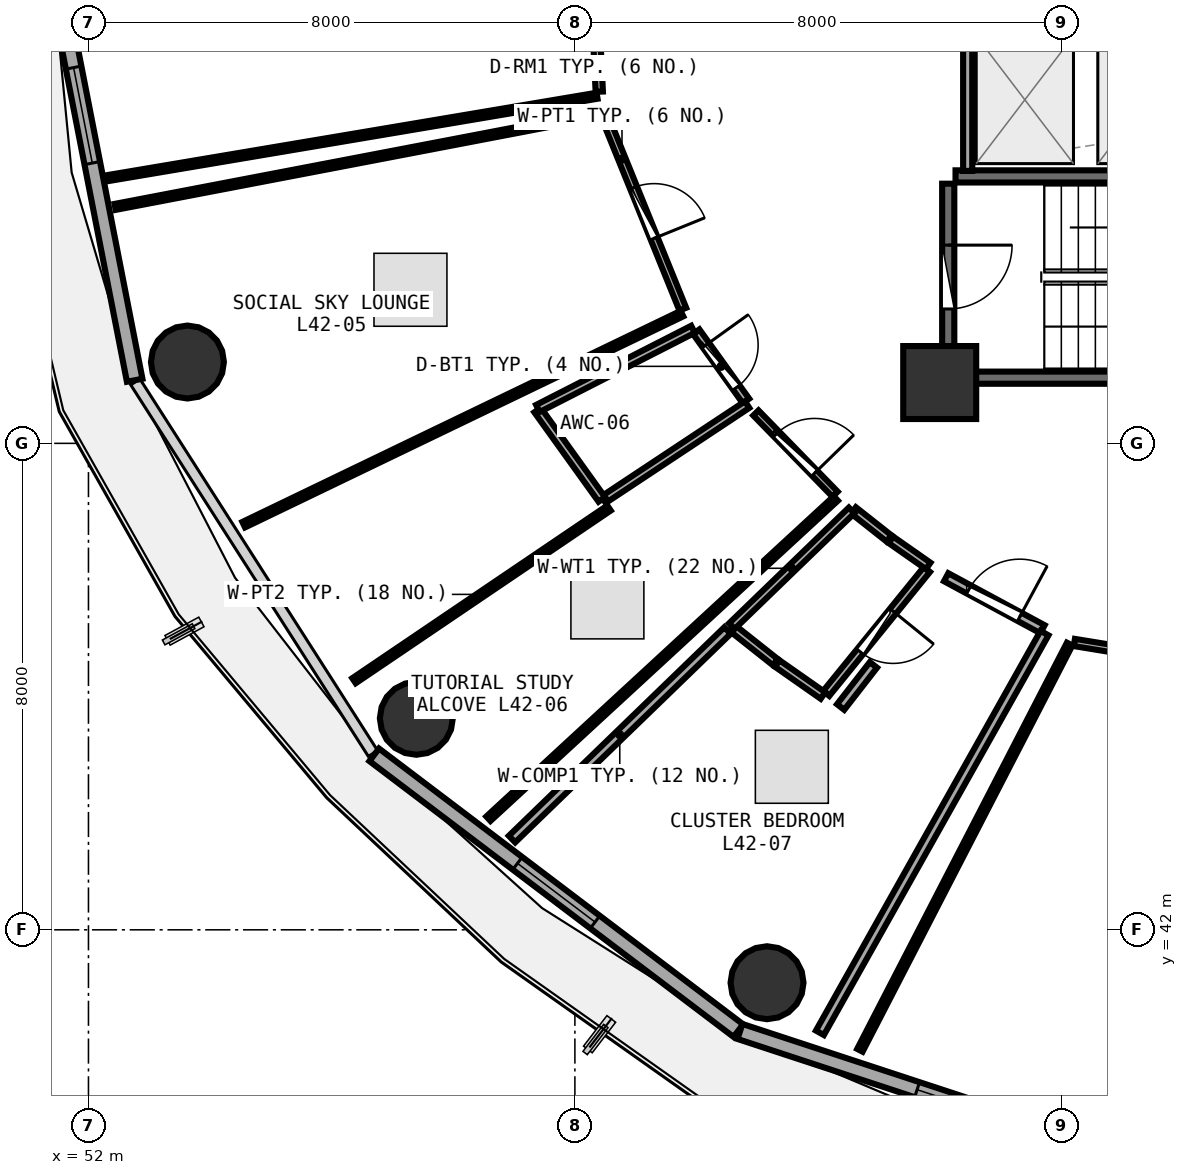
"""IFC4 building model, lengths in metres.
Left out: names, types, materials, properties, quantities, classifications, styles, units other than length and angle.
Written with IfcOpenShell. Run it as: python <this file> out.ifc"""

import sys

from ifc_helpers import new_model, si_unit, direction, frame, frame_2d, origin, origin_2d, place, context, subcontext, project, spatial, rectangle, circle, extrude, element, fill, save


model = new_model("IFC4")
c1 = context("Model", 3, precision=1e-05, world=origin(), true_north=direction((0.0, 1.0)))
c2 = subcontext(c1, "Body", "Model", "MODEL_VIEW")
j1 = project(units=[si_unit("LENGTHUNIT", "METRE"), si_unit("PLANEANGLEUNIT", "RADIAN")], contexts=[c1])
p1 = place(None, origin())
s1 = spatial("IfcSite", under=j1, at=p1, CompositionType="ELEMENT")
p2 = place(p1, origin())
s2 = spatial("IfcBuilding", under=s1, at=p2, CompositionType="ELEMENT")
p3 = place(p2, frame((0.0, 0.0, 165.6)))
s3 = spatial("IfcBuildingStorey", under=s2, at=p3, CompositionType="ELEMENT", Elevation=165.6)
p4 = place(p3, frame((66.0, 51.0, 0.0), z_axis=(0.0, 0.0, 1.0), x_axis=(1.0, 0.0, 0.0)))
e1 = element("IfcColumn", 1, at=p4, inside=s3, PredefinedType="PILASTER", context=c2, shape_type="SweptSolid", body=[
    extrude(rectangle(XDim=1.2, YDim=1.2, at=origin_2d()), origin(), (0.0, 0.0, 1.0), 3.75),
])
for number, where, z_axis, x_axis in (
    (2, (53.627, 51.337, 0.0), (0.0, 0.0, 1.0), (1.0, 0.0, 0.0)),
    (3, (57.392, 45.479, 0.0), (0.0, 0.0, 1.0), (1.0, 0.0, 0.0)),
    (4, (63.16, 41.13, 0.0), (0.0, 0.0, 1.0), (1.0, 0.0, 0.0)),
):
    element("IfcColumn", number, at=place(p3, frame(where, z_axis=z_axis, x_axis=x_axis)), inside=s3, PredefinedType="COLUMN", context=c2, shape_type="SweptSolid", body=[
        extrude(circle(Radius=0.6, at=origin_2d()), origin(), (0.0, 0.0, 1.0), 3.75),
    ])
p5 = place(p3, frame((51.403, 57.985, 0.0), z_axis=(0.0, 0.0, 1.0), x_axis=(0.191716984769, -0.981450252306, 0.0)))
e5 = element("IfcWall", 5, at=p5, inside=s3, PredefinedType="SOLIDWALL", context=c2, shape_type="SweptSolid", body=[
    extrude(rectangle(XDim=7.079, YDim=0.26, at=frame_2d((3.54, 0.0))), origin(), (0.0, 0.0, 1.0), 3.475),
])
p6 = place(p5, frame((1.84, 0.0, 0.85)))
e6 = element("IfcOpeningElement", 6, at=p6, cuts=e5, PredefinedType="OPENING", context=c2, shape_type="SweptSolid", body=[
    extrude(rectangle(XDim=1.6, YDim=1.45, at=frame_2d((0.8, 0.725))), frame((0.0, 0.14, 0.0), z_axis=(0.0, -1.0, 0.0), x_axis=(1.0, 0.0, 0.0)), (0.0, 0.0, 1.0), 0.28),
])
p7 = place(p3, frame((56.699, 44.878, 0.0), z_axis=(0.0, 0.0, 1.0), x_axis=(0.797163719609, -0.603763202042, 0.0)))
e7 = element("IfcWall", 7, at=p7, inside=s3, PredefinedType="SOLIDWALL", context=c2, shape_type="SweptSolid", body=[
    extrude(rectangle(XDim=7.512, YDim=0.26, at=frame_2d((3.756, 0.0))), origin(), (0.0, 0.0, 1.0), 3.475),
])
p8 = place(p7, frame((2.956, 0.0, 0.85)))
e8 = element("IfcOpeningElement", 8, at=p8, cuts=e7, PredefinedType="OPENING", context=c2, shape_type="SweptSolid", body=[
    extrude(rectangle(XDim=1.6, YDim=1.45, at=frame_2d((0.8, 0.725))), frame((0.0, 0.14, 0.0), z_axis=(0.0, -1.0, 0.0), x_axis=(1.0, 0.0, 0.0)), (0.0, 0.0, 1.0), 0.28),
])
p9 = place(p3, frame((62.714, 40.328, 0.0), z_axis=(0.0, 0.0, 1.0), x_axis=(0.950038302428, -0.312133343173, 0.0)))
e9 = element("IfcWall", 9, at=p9, inside=s3, PredefinedType="SOLIDWALL", context=c2, shape_type="SweptSolid", body=[
    extrude(rectangle(XDim=7.733, YDim=0.26, at=frame_2d((3.867, 0.0))), origin(), (0.0, 0.0, 1.0), 3.475),
])
p10 = place(p9, frame((3.067, 0.0, 0.85)))
e10 = element("IfcOpeningElement", 10, at=p10, cuts=e9, PredefinedType="OPENING", context=c2, shape_type="SweptSolid", body=[
    extrude(rectangle(XDim=1.6, YDim=1.45, at=frame_2d((0.8, 0.725))), frame((0.0, 0.14, 0.0), z_axis=(0.0, -1.0, 0.0), x_axis=(1.0, 0.0, 0.0)), (0.0, 0.0, 1.0), 0.28),
])
for number, where, z_axis, x_axis in (
    (11, (66.26, 51.08, 0.0), (0.0, 0.0, 1.0), (1.0, 0.0, 0.0)),
    (12, (73.42, 54.39, 0.0), (0.0, 0.0, 1.0), (-1.0, 0.0, 0.0)),
):
    element("IfcWall", number, at=place(p3, frame(where, z_axis=z_axis, x_axis=x_axis)), inside=s3, PredefinedType="SHEAR", context=c2, shape_type="SweptSolid", body=[
        extrude(rectangle(XDim=7.16, YDim=0.2, at=frame_2d((3.58, 0.0))), origin(), (0.0, 0.0, 1.0), 3.49),
    ])
p11 = place(p3, frame((66.14, 54.27, 0.0), z_axis=(0.0, 0.0, 1.0), x_axis=(0.0, -1.0, 0.0)))
e13 = element("IfcWall", 13, at=p11, inside=s3, PredefinedType="SHEAR", context=c2, shape_type="SweptSolid", body=[
    extrude(rectangle(XDim=3.07, YDim=0.2, at=frame_2d((1.535, 0.0))), origin(), (0.0, 0.0, 1.0), 3.49),
])
p12 = place(p11, frame((1.01, 0.0, 0.0)))
e14 = element("IfcOpeningElement", 14, at=p12, cuts=e13, PredefinedType="OPENING", context=c2, shape_type="SweptSolid", body=[
    extrude(rectangle(XDim=1.05, YDim=2.1, at=frame_2d((0.525, 1.05))), frame((0.0, 0.11, 0.0), z_axis=(0.0, -1.0, 0.0), x_axis=(1.0, 0.0, 0.0)), (0.0, 0.0, 1.0), 0.22),
])
p13 = place(p3, frame((66.46, 54.48, 0.0), z_axis=(0.0, 0.0, 1.0), x_axis=(0.0, 1.0, 0.0)))
e15 = element("IfcWall", 15, at=p13, inside=s3, PredefinedType="PARTITIONING", context=c2, shape_type="SweptSolid", body=[
    extrude(rectangle(XDim=2.29, YDim=0.15, at=frame_2d((1.145, 0.0))), origin(), (0.0, 0.0, 1.0), 3.48),
])
p14 = place(p3, frame((68.214, 46.725, 0.0), z_axis=(0.0, 0.0, 1.0), x_axis=(0.986922164317, -0.161197523493, 0.0)))
e16 = element("IfcWall", 16, at=p14, inside=s3, PredefinedType="PARTITIONING", context=c2, shape_type="SweptSolid", body=[
    extrude(rectangle(XDim=6.877, YDim=0.12, at=frame_2d((3.439, 0.0))), origin(), (0.0, 0.0, 1.0), 2.975),
])
p15 = place(p14, frame((2.989, 0.0, 0.0)))
e17 = element("IfcOpeningElement", 17, at=p15, cuts=e16, PredefinedType="OPENING", context=c2, shape_type="SweptSolid", body=[
    extrude(rectangle(XDim=0.9, YDim=2.08, at=frame_2d((0.45, 1.04))), frame((0.0, 0.07, 0.0), z_axis=(0.0, -1.0, 0.0), x_axis=(1.0, 0.0, 0.0)), (0.0, 0.0, 1.0), 0.14),
])
p16 = place(p3, frame((60.238, 59.144, 0.0), z_axis=(0.0, 0.0, 1.0), x_axis=(0.048537190422, -0.998821375996, 0.0)))
e18 = element("IfcWall", 18, at=p16, inside=s3, PredefinedType="PARTITIONING", context=c2, shape_type="SweptSolid", body=[
    extrude(rectangle(XDim=3.365, YDim=0.12, at=frame_2d((1.683, 0.0))), origin(), (0.0, 0.0, 1.0), 2.975),
])
p17 = place(p16, frame((1.233, 0.0, 0.0)))
e19 = element("IfcOpeningElement", 19, at=p17, cuts=e18, PredefinedType="OPENING", context=c2, shape_type="SweptSolid", body=[
    extrude(rectangle(XDim=0.9, YDim=2.08, at=frame_2d((0.45, 1.04))), frame((0.0, 0.07, 0.0), z_axis=(0.0, -1.0, 0.0), x_axis=(1.0, 0.0, 0.0)), (0.0, 0.0, 1.0), 0.14),
])
p18 = place(p3, frame((60.492, 55.369, 0.0), z_axis=(0.0, 0.0, 1.0), x_axis=(0.3756420079, -0.926764847143, 0.0)))
e20 = element("IfcWall", 20, at=p18, inside=s3, PredefinedType="PARTITIONING", context=c2, shape_type="SweptSolid", body=[
    extrude(rectangle(XDim=3.413, YDim=0.12, at=frame_2d((1.707, 0.0))), origin(), (0.0, 0.0, 1.0), 3.235),
])
p19 = place(p18, frame((1.256, 0.0, 0.0)))
e21 = element("IfcOpeningElement", 21, at=p19, cuts=e20, PredefinedType="OPENING", context=c2, shape_type="SweptSolid", body=[
    extrude(rectangle(XDim=0.9, YDim=2.08, at=frame_2d((0.45, 1.04))), frame((0.0, 0.07, 0.0), z_axis=(0.0, -1.0, 0.0), x_axis=(1.0, 0.0, 0.0)), (0.0, 0.0, 1.0), 0.14),
])
p20 = place(p3, frame((61.995, 51.836, 0.0), z_axis=(0.0, 0.0, 1.0), x_axis=(0.583589438572, -0.81204886995, 0.0)))
e22 = element("IfcWall", 22, at=p20, inside=s3, PredefinedType="PLUMBINGWALL", context=c2, shape_type="SweptSolid", body=[
    extrude(rectangle(XDim=1.403, YDim=0.13, at=frame_2d((0.702, 0.0))), origin(), (0.0, 0.0, 1.0), 2.975),
])
p21 = place(p20, frame((0.272, 0.0, 0.0)))
e23 = element("IfcOpeningElement", 23, at=p21, cuts=e22, PredefinedType="OPENING", context=c2, shape_type="SweptSolid", body=[
    extrude(rectangle(XDim=0.86, YDim=2.05, at=frame_2d((0.43, 1.025))), frame((0.0, 0.075, 0.0), z_axis=(0.0, -1.0, 0.0), x_axis=(1.0, 0.0, 0.0)), (0.0, 0.0, 1.0), 0.15),
])
p22 = place(p3, frame((62.977, 50.5, 0.0), z_axis=(0.0, 0.0, 1.0), x_axis=(0.69801962686, -0.71607862733, 0.0)))
e24 = element("IfcWall", 24, at=p22, inside=s3, PredefinedType="PARTITIONING", context=c2, shape_type="SweptSolid", body=[
    extrude(rectangle(XDim=1.866, YDim=0.12, at=frame_2d((0.933, 0.0))), origin(), (0.0, 0.0, 1.0), 2.975),
])
p23 = place(p22, frame((0.483, 0.0, 0.0)))
e25 = element("IfcOpeningElement", 25, at=p23, cuts=e24, PredefinedType="OPENING", context=c2, shape_type="SweptSolid", body=[
    extrude(rectangle(XDim=0.9, YDim=2.08, at=frame_2d((0.45, 1.04))), frame((0.0, 0.07, 0.0), z_axis=(0.0, -1.0, 0.0), x_axis=(1.0, 0.0, 0.0)), (0.0, 0.0, 1.0), 0.14),
])
p24 = place(p3, frame((65.789, 47.927, 0.0), z_axis=(0.0, 0.0, 1.0), x_axis=(-0.630358119741, -0.776304476914, 0.0)))
e26 = element("IfcWall", 26, at=p24, inside=s3, PredefinedType="PLUMBINGWALL", context=c2, shape_type="SweptSolid", body=[
    extrude(rectangle(XDim=2.626, YDim=0.13, at=frame_2d((1.313, 0.0))), origin(), (0.0, 0.0, 1.0), 2.975),
])
p25 = place(p24, frame((0.883, 0.0, 0.0)))
e27 = element("IfcOpeningElement", 27, at=p25, cuts=e26, PredefinedType="OPENING", context=c2, shape_type="SweptSolid", body=[
    extrude(rectangle(XDim=0.86, YDim=2.05, at=frame_2d((0.43, 1.025))), frame((0.0, 0.075, 0.0), z_axis=(0.0, -1.0, 0.0), x_axis=(1.0, 0.0, 0.0)), (0.0, 0.0, 1.0), 0.15),
])
p26 = place(p3, frame((66.106, 47.799, 0.0), z_axis=(0.0, 0.0, 1.0), x_axis=(0.880052757217, -0.474875925389, 0.0)))
e28 = element("IfcWall", 28, at=p26, inside=s3, PredefinedType="PARTITIONING", context=c2, shape_type="SweptSolid", body=[
    extrude(rectangle(XDim=1.801, YDim=0.15, at=frame_2d((0.9, 0.0))), origin(), (0.0, 0.0, 1.0), 3.235),
])
p27 = place(p26, frame((0.425, 0.0, 0.0)))
e29 = element("IfcOpeningElement", 29, at=p27, cuts=e28, PredefinedType="OPENING", context=c2, shape_type="SweptSolid", body=[
    extrude(rectangle(XDim=0.95, YDim=2.08, at=frame_2d((0.475, 1.04))), frame((0.0, 0.085, 0.0), z_axis=(0.0, -1.0, 0.0), x_axis=(1.0, 0.0, 0.0)), (0.0, 0.0, 1.0), 0.17),
])
p28 = place(p3, frame((64.688, 40.019, 0.0), z_axis=(0.0, 0.0, 1.0), x_axis=(0.458748787104, 0.888566007864, 0.0)))
e30 = element("IfcWall", 30, at=p28, inside=s3, PredefinedType="PARTITIONING", context=c2, shape_type="SweptSolid", body=[
    extrude(rectangle(XDim=7.519, YDim=0.1, at=frame_2d((3.759, 0.0))), origin(), (0.0, 0.0, 1.0), 3.025),
])
p29 = place(p3, frame((60.365, 55.716, 0.0), z_axis=(0.0, 0.0, 1.0), x_axis=(-0.986127701838, -0.165988420279, 0.0)))
e31 = element("IfcWall", 31, at=p29, inside=s3, PredefinedType="PARTITIONING", context=c2, shape_type="SweptSolid", body=[
    extrude(rectangle(XDim=8.144, YDim=0.1, at=frame_2d((4.072, 0.0))), origin(), (0.0, 0.0, 1.0), 3.025),
])
p30 = place(p3, frame((61.761, 52.134, 0.0), z_axis=(0.0, 0.0, 1.0), x_axis=(-0.900968975812, -0.433883515042, 0.0)))
e32 = element("IfcWall", 32, at=p30, inside=s3, PredefinedType="PARTITIONING", context=c2, shape_type="SweptSolid", body=[
    extrude(rectangle(XDim=8.0, YDim=0.1, at=frame_2d((4.0, 0.0))), origin(), (0.0, 0.0, 1.0), 2.975),
])
p31 = place(p3, frame((52.438, 53.888, 0.0), z_axis=(0.0, 0.0, 1.0), x_axis=(0.982187250003, 0.187904778897, 0.0)))
e33 = element("IfcWall", 33, at=p31, inside=s3, PredefinedType="PARTITIONING", context=c2, shape_type="SweptSolid", body=[
    extrude(rectangle(XDim=8.137, YDim=0.1, at=frame_2d((4.069, 0.0))), origin(), (0.0, 0.0, 1.0), 3.025),
])
p32 = place(p3, frame((62.832, 50.637, 0.0), z_axis=(0.0, 0.0, 1.0), x_axis=(-0.833743735775, -0.55215159427, 0.0)))
e34 = element("IfcWall", 34, at=p32, inside=s3, PredefinedType="PLUMBINGWALL", context=c2, shape_type="SweptSolid", body=[
    extrude(rectangle(XDim=2.833, YDim=0.13, at=frame_2d((1.416, 0.0))), origin(), (0.0, 0.0, 1.0), 3.235),
])
p33 = place(p3, frame((60.442, 49.078, 0.0), z_axis=(0.0, 0.0, 1.0), x_axis=(-0.583480474688, 0.812127167172, 0.0)))
e35 = element("IfcWall", 35, at=p33, inside=s3, PredefinedType="PLUMBINGWALL", context=c2, shape_type="SweptSolid", body=[
    extrude(rectangle(XDim=1.811, YDim=0.13, at=frame_2d((0.906, 0.0))), origin(), (0.0, 0.0, 1.0), 3.48),
])
p34 = place(p3, frame((59.392, 50.574, 0.0), z_axis=(0.0, 0.0, 1.0), x_axis=(0.890678731245, 0.45463325627, 0.0)))
e36 = element("IfcWall", 36, at=p34, inside=s3, PredefinedType="PLUMBINGWALL", context=c2, shape_type="SweptSolid", body=[
    extrude(rectangle(XDim=2.863, YDim=0.13, at=frame_2d((1.432, 0.0))), origin(), (0.0, 0.0, 1.0), 2.975),
])
p35 = place(p3, frame((64.292, 49.094, 0.0), z_axis=(0.0, 0.0, 1.0), x_axis=(-0.73529828134, -0.677743636973, 0.0)))
e37 = element("IfcWall", 37, at=p35, inside=s3, PredefinedType="PARTITIONING", context=c2, shape_type="SweptSolid", body=[
    extrude(rectangle(XDim=7.771, YDim=0.1, at=frame_2d((3.886, 0.0))), origin(), (0.0, 0.0, 1.0), 3.025),
])
p36 = place(p3, frame((56.367, 46.096, 0.0), z_axis=(0.0, 0.0, 1.0), x_axis=(0.828061619218, 0.560637097219, 0.0)))
e38 = element("IfcWall", 38, at=p36, inside=s3, PredefinedType="PARTITIONING", context=c2, shape_type="SweptSolid", body=[
    extrude(rectangle(XDim=5.065, YDim=0.1, at=frame_2d((2.532, 0.0))), origin(), (0.0, 0.0, 1.0), 3.025),
])
p37 = place(p3, frame((64.581, 48.899, 0.0), z_axis=(0.0, 0.0, 1.0), x_axis=(0.785042223167, -0.619442255456, 0.0)))
e39 = element("IfcWall", 39, at=p37, inside=s3, PredefinedType="PLUMBINGWALL", context=c2, shape_type="SweptSolid", body=[
    extrude(rectangle(XDim=0.745, YDim=0.13, at=frame_2d((0.372, 0.0))), origin(), (0.0, 0.0, 1.0), 2.975),
])
p38 = place(p3, frame((65.198, 48.414, 0.0), z_axis=(0.0, 0.0, 1.0), x_axis=(0.819339212877, -0.573309039038, 0.0)))
e40 = element("IfcWall", 40, at=p38, inside=s3, PredefinedType="PLUMBINGWALL", context=c2, shape_type="SweptSolid", body=[
    extrude(rectangle(XDim=0.748, YDim=0.13, at=frame_2d((0.374, 0.0))), origin(), (0.0, 0.0, 1.0), 2.975),
])
p39 = place(p3, frame((64.08, 45.853, 0.0), z_axis=(0.0, 0.0, 1.0), x_axis=(-0.819219412421, 0.57348021266, 0.0)))
e41 = element("IfcWall", 41, at=p39, inside=s3, PredefinedType="PLUMBINGWALL", context=c2, shape_type="SweptSolid", body=[
    extrude(rectangle(XDim=0.917, YDim=0.13, at=frame_2d((0.458, 0.0))), origin(), (0.0, 0.0, 1.0), 3.48),
])
p40 = place(p3, frame((63.296, 46.402, 0.0), z_axis=(0.0, 0.0, 1.0), x_axis=(-0.783920729318, 0.620860926573, 0.0)))
e42 = element("IfcWall", 42, at=p40, inside=s3, PredefinedType="PLUMBINGWALL", context=c2, shape_type="SweptSolid", body=[
    extrude(rectangle(XDim=0.91, YDim=0.13, at=frame_2d((0.455, 0.0))), origin(), (0.0, 0.0, 1.0), 3.48),
])
p41 = place(p3, frame((62.581, 46.994, 0.0), z_axis=(0.0, 0.0, 1.0), x_axis=(0.719038860306, 0.694969867958, 0.0)))
e43 = element("IfcWall", 43, at=p41, inside=s3, PredefinedType="PLUMBINGWALL", context=c2, shape_type="SweptSolid", body=[
    extrude(rectangle(XDim=2.739, YDim=0.13, at=frame_2d((1.369, 0.0))), origin(), (0.0, 0.0, 1.0), 3.235),
])
p42 = place(p3, frame((67.723, 46.88, 0.0), z_axis=(0.0, 0.0, 1.0), x_axis=(-0.489843086235, -0.8718106164, 0.0)))
e44 = element("IfcWall", 44, at=p42, inside=s3, PredefinedType="PARTITIONING", context=c2, shape_type="SweptSolid", body=[
    extrude(rectangle(XDim=7.541, YDim=0.15, at=frame_2d((3.771, 0.0))), origin(), (0.0, 0.0, 1.0), 3.025),
])
p43 = place(p3, frame((58.966, 43.492, 0.0), z_axis=(0.0, 0.0, 1.0), x_axis=(0.718569427948, 0.695455230204, 0.0)))
e45 = element("IfcWall", 45, at=p43, inside=s3, PredefinedType="PARTITIONING", context=c2, shape_type="SweptSolid", body=[
    extrude(rectangle(XDim=4.933, YDim=0.15, at=frame_2d((2.466, 0.0))), origin(), (0.0, 0.0, 1.0), 3.025),
])
p44 = place(p3, frame((64.371, 45.664, 0.0), z_axis=(0.0, 0.0, 1.0), x_axis=(0.613921364126, 0.789367188747, 0.0)))
e46 = element("IfcWall", 46, at=p44, inside=s3, PredefinedType="PARTITIONING", context=c2, shape_type="SweptSolid", body=[
    extrude(rectangle(XDim=0.878, YDim=0.15, at=frame_2d((0.439, 0.0))), origin(), (0.0, 0.0, 1.0), 2.975),
])
p45 = place(p6, origin())
e47 = element("IfcWindow", 47, at=p45, inside=s3, PartitioningType="SINGLE_PANEL", PredefinedType="WINDOW", context=c2, shape_type="SweptSolid", body=[
    extrude(rectangle(XDim=1.6, YDim=1.45, at=frame_2d((0.8, 0.725))), frame((0.0, 0.03, 0.0), z_axis=(0.0, -1.0, 0.0), x_axis=(1.0, 0.0, 0.0)), (0.0, 0.0, 1.0), 0.06),
])
fill(e6, e47)
p46 = place(p8, origin())
e48 = element("IfcWindow", 48, at=p46, inside=s3, PartitioningType="SINGLE_PANEL", PredefinedType="WINDOW", context=c2, shape_type="SweptSolid", body=[
    extrude(rectangle(XDim=1.6, YDim=1.45, at=frame_2d((0.8, 0.725))), frame((0.0, 0.03, 0.0), z_axis=(0.0, -1.0, 0.0), x_axis=(1.0, 0.0, 0.0)), (0.0, 0.0, 1.0), 0.06),
])
fill(e8, e48)
p47 = place(p10, origin())
e49 = element("IfcWindow", 49, at=p47, inside=s3, PartitioningType="SINGLE_PANEL", PredefinedType="WINDOW", context=c2, shape_type="SweptSolid", body=[
    extrude(rectangle(XDim=1.6, YDim=1.45, at=frame_2d((0.8, 0.725))), frame((0.0, 0.03, 0.0), z_axis=(0.0, -1.0, 0.0), x_axis=(1.0, 0.0, 0.0)), (0.0, 0.0, 1.0), 0.06),
])
fill(e10, e49)
p48 = place(p12, origin())
e50 = element("IfcDoor", 50, at=p48, inside=s3, OperationType="SINGLE_SWING_LEFT", PredefinedType="DOOR", context=c2, shape_type="SweptSolid", body=[
    extrude(rectangle(XDim=1.05, YDim=2.1, at=frame_2d((0.525, 1.05))), frame((0.0, 0.025, 0.0), z_axis=(0.0, -1.0, 0.0), x_axis=(1.0, 0.0, 0.0)), (0.0, 0.0, 1.0), 0.05),
])
fill(e14, e50)
p49 = place(p19, origin())
e51 = element("IfcDoor", 51, at=p49, inside=s3, OperationType="SINGLE_SWING_RIGHT", PredefinedType="DOOR", context=c2, shape_type="SweptSolid", body=[
    extrude(rectangle(XDim=0.9, YDim=2.08, at=frame_2d((0.45, 1.04))), frame((0.0, 0.025, 0.0), z_axis=(0.0, -1.0, 0.0), x_axis=(1.0, 0.0, 0.0)), (0.0, 0.0, 1.0), 0.05),
])
fill(e21, e51)
p50 = place(p21, origin())
e52 = element("IfcDoor", 52, at=p50, inside=s3, OperationType="SINGLE_SWING_LEFT", PredefinedType="DOOR", context=c2, shape_type="SweptSolid", body=[
    extrude(rectangle(XDim=0.86, YDim=2.05, at=frame_2d((0.43, 1.025))), frame((0.0, 0.025, 0.0), z_axis=(0.0, -1.0, 0.0), x_axis=(1.0, 0.0, 0.0)), (0.0, 0.0, 1.0), 0.05),
])
fill(e23, e52)
p51 = place(p23, origin())
e53 = element("IfcDoor", 53, at=p51, inside=s3, OperationType="SINGLE_SWING_RIGHT", PredefinedType="DOOR", context=c2, shape_type="SweptSolid", body=[
    extrude(rectangle(XDim=0.9, YDim=2.08, at=frame_2d((0.45, 1.04))), frame((0.0, 0.025, 0.0), z_axis=(0.0, -1.0, 0.0), x_axis=(1.0, 0.0, 0.0)), (0.0, 0.0, 1.0), 0.05),
])
fill(e25, e53)
p52 = place(p25, origin())
e54 = element("IfcDoor", 54, at=p52, inside=s3, OperationType="SINGLE_SWING_LEFT", PredefinedType="DOOR", context=c2, shape_type="SweptSolid", body=[
    extrude(rectangle(XDim=0.86, YDim=2.05, at=frame_2d((0.43, 1.025))), frame((0.0, 0.025, 0.0), z_axis=(0.0, -1.0, 0.0), x_axis=(1.0, 0.0, 0.0)), (0.0, 0.0, 1.0), 0.05),
])
fill(e27, e54)
p53 = place(p27, origin())
e55 = element("IfcDoor", 55, at=p53, inside=s3, OperationType="SINGLE_SWING_RIGHT", PredefinedType="DOOR", context=c2, shape_type="SweptSolid", body=[
    extrude(rectangle(XDim=0.95, YDim=2.08, at=frame_2d((0.475, 1.04))), frame((0.0, 0.025, 0.0), z_axis=(0.0, -1.0, 0.0), x_axis=(1.0, 0.0, 0.0)), (0.0, 0.0, 1.0), 0.05),
])
fill(e29, e55)
save(model, sys.argv[1])
